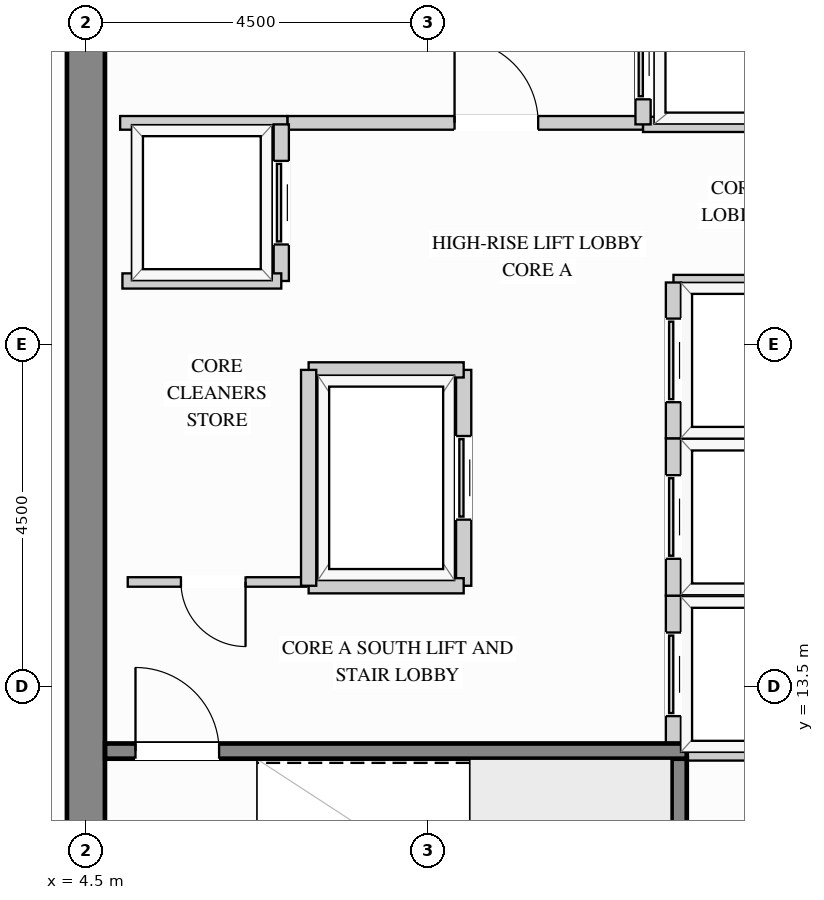
"""IFC4 building model, lengths in metres.
Left out: names, types, materials, properties, quantities, classifications, styles, units other than length and angle.
Written with IfcOpenShell. Run it as: python <this file> out.ifc"""

import sys

from ifc_helpers import new_model, si_unit, direction, frame, frame_2d, origin, place, context, subcontext, project, spatial, rectangle, extrude, source, transform, mapped, element, fill, save


model = new_model("IFC4")
c1 = context("Model", 3, precision=1e-05, world=origin(), true_north=direction((0.0, 1.0)))
c2 = subcontext(c1, "Body", "Model", "MODEL_VIEW")
j1 = project(units=[si_unit("LENGTHUNIT", "METRE"), si_unit("PLANEANGLEUNIT", "RADIAN")], contexts=[c1])
p1 = place(None, origin())
s1 = spatial("IfcSite", under=j1, at=p1, CompositionType="ELEMENT")
p2 = place(p1, origin())
s2 = spatial("IfcBuilding", under=s1, at=p2, CompositionType="ELEMENT")
p3 = place(p2, frame((0.0, 0.0, 266.4)))
s3 = spatial("IfcBuildingStorey", under=s2, at=p3, CompositionType="ELEMENT", Elevation=266.4)
m1 = source(origin(), c2, "Body", "SweptSolid", [
    extrude(rectangle(XDim=20.5, YDim=0.5, at=frame_2d((10.25, 0.0))), origin(), (0.0, 0.0, 1.0), 3.4),
])
p4 = place(p3, frame((4.5, 8.75, 0.0), z_axis=(0.0, 0.0, 1.0), x_axis=(0.0, 1.0, 0.0)))
e1 = element("IfcWall", 1, at=p4, inside=s3, PredefinedType="SHEAR", context=c2, shape_type="MappedRepresentation", body=[
    mapped(m1, transform((0.0, 0.0, 0.0), x_axis=(1.0, 0.0, 0.0), y_axis=(0.0, 1.0, 0.0), z_axis=(0.0, 0.0, 1.0))),
])
p5 = place(p3, frame((7.15, 20.92, 0.0), z_axis=(0.0, 0.0, 1.0), x_axis=(1.0, 0.0, 0.0)))
e2 = element("IfcWall", 2, at=p5, inside=s3, PredefinedType="PARTITIONING", context=c2, shape_type="SweptSolid", body=[
    extrude(rectangle(XDim=4.68, YDim=0.18, at=frame_2d((2.34, 0.0))), origin(), (0.0, 0.0, 1.0), 3.385),
])
p6 = place(p5, frame((2.2, 0.0, 0.0)))
e3 = element("IfcOpeningElement", 3, at=p6, cuts=e2, PredefinedType="OPENING", context=c2, shape_type="SweptSolid", body=[
    extrude(rectangle(XDim=1.1, YDim=2.15, at=frame_2d((0.55, 1.075))), frame((0.0, 0.1, 0.0), z_axis=(0.0, -1.0, 0.0), x_axis=(1.0, 0.0, 0.0)), (0.0, 0.0, 1.0), 0.2),
])
m2 = source(origin(), c2, "Body", "SweptSolid", [
    extrude(rectangle(XDim=2.2, YDim=0.18, at=frame_2d((1.1, 0.0))), origin(), (0.0, 0.0, 1.0), 3.385),
])
p7 = place(p3, frame((4.95, 20.92, 0.0), z_axis=(0.0, 0.0, 1.0), x_axis=(1.0, 0.0, 0.0)))
e4 = element("IfcWall", 4, at=p7, inside=s3, PredefinedType="PARTITIONING", context=c2, shape_type="MappedRepresentation", body=[
    mapped(m2, transform((0.0, 0.0, 0.0), x_axis=(1.0, 0.0, 0.0), y_axis=(0.0, 1.0, 0.0), z_axis=(0.0, 0.0, 1.0))),
])
p8 = place(p3, frame((5.05, 14.88, 0.0), z_axis=(0.0, 0.0, 1.0), x_axis=(1.0, 0.0, 0.0)))
e5 = element("IfcWall", 5, at=p8, inside=s3, PredefinedType="PARTITIONING", context=c2, shape_type="SweptSolid", body=[
    extrude(rectangle(XDim=2.35, YDim=0.125, at=frame_2d((1.175, 0.0))), origin(), (0.0, 0.0, 1.0), 3.385),
])
p9 = place(p8, frame((0.7, 0.0, 0.0)))
e6 = element("IfcOpeningElement", 6, at=p9, cuts=e5, PredefinedType="OPENING", context=c2, shape_type="SweptSolid", body=[
    extrude(rectangle(XDim=0.85, YDim=2.1, at=frame_2d((0.425, 1.05))), frame((0.0, 0.073, 0.0), z_axis=(0.0, -1.0, 0.0), x_axis=(1.0, 0.0, 0.0)), (0.0, 0.0, 1.0), 0.145),
])
m3 = source(origin(), c2, "Body", "SweptSolid", [
    extrude(rectangle(XDim=2.39, YDim=0.2, at=frame_2d((1.195, 0.0))), origin(), (0.0, 0.0, 1.0), 3.385),
])
p10 = place(p3, frame((11.83, 20.9, 0.0), z_axis=(0.0, 0.0, 1.0), x_axis=(1.0, 0.0, 0.0)))
e7 = element("IfcWall", 7, at=p10, inside=s3, PredefinedType="PARTITIONING", context=c2, shape_type="MappedRepresentation", body=[
    mapped(m3, transform((0.0, 0.0, 0.0), x_axis=(1.0, 0.0, 0.0), y_axis=(0.0, 1.0, 0.0), z_axis=(0.0, 0.0, 1.0))),
])
p11 = place(p3, frame((11.83, 20.9, 0.0), z_axis=(0.0, 0.0, 1.0), x_axis=(0.0, 1.0, 0.0)))
e8 = element("IfcWall", 8, at=p11, inside=s3, PredefinedType="PARTITIONING", context=c2, shape_type="SweptSolid", body=[
    extrude(rectangle(XDim=1.76, YDim=0.2, at=frame_2d((0.88, 0.0))), origin(), (0.0, 0.0, 1.0), 3.385),
])
p12 = place(p11, frame((0.33, 0.0, 0.0)))
e9 = element("IfcOpeningElement", 9, at=p12, cuts=e8, PredefinedType="OPENING", context=c2, shape_type="SweptSolid", body=[
    extrude(rectangle(XDim=1.1, YDim=2.2, at=frame_2d((0.55, 1.1))), frame((0.0, 0.11, 0.0), z_axis=(0.0, -1.0, 0.0), x_axis=(1.0, 0.0, 0.0)), (0.0, 0.0, 1.0), 0.22),
])
m4 = source(origin(), c2, "Body", "SweptSolid", [
    extrude(rectangle(XDim=1.99, YDim=0.2, at=frame_2d((0.995, 0.0))), origin(), (0.0, 0.0, 1.0), 3.385),
])
for number, where, z_axis, x_axis in (
    (10, (12.23, 14.7, 0.0), (0.0, 0.0, 1.0), (1.0, 0.0, 0.0)),
    (11, (12.23, 12.63, 0.0), (0.0, 0.0, 1.0), (1.0, 0.0, 0.0)),
):
    element("IfcWall", number, at=place(p3, frame(where, z_axis=z_axis, x_axis=x_axis)), inside=s3, PredefinedType="PARTITIONING", context=c2, shape_type="MappedRepresentation", body=[
        mapped(m4, transform((0.0, 0.0, 0.0), x_axis=(1.0, 0.0, 0.0), y_axis=(0.0, 1.0, 0.0), z_axis=(0.0, 0.0, 1.0))),
    ])
p13 = place(p3, frame((12.23, 12.63, 0.0), z_axis=(0.0, 0.0, 1.0), x_axis=(0.0, 1.0, 0.0)))
e12 = element("IfcWall", 12, at=p13, inside=s3, PredefinedType="PARTITIONING", context=c2, shape_type="SweptSolid", body=[
    extrude(rectangle(XDim=2.07, YDim=0.2, at=frame_2d((1.035, 0.0))), origin(), (0.0, 0.0, 1.0), 3.385),
])
p14 = place(p13, frame((0.485, 0.0, 0.0)))
e13 = element("IfcOpeningElement", 13, at=p14, cuts=e12, PredefinedType="OPENING", context=c2, shape_type="SweptSolid", body=[
    extrude(rectangle(XDim=1.1, YDim=2.2, at=frame_2d((0.55, 1.1))), frame((0.0, 0.11, 0.0), z_axis=(0.0, -1.0, 0.0), x_axis=(1.0, 0.0, 0.0)), (0.0, 0.0, 1.0), 0.22),
])
p15 = place(p3, frame((12.23, 16.77, 0.0), z_axis=(0.0, 0.0, 1.0), x_axis=(1.0, 0.0, 0.0)))
e14 = element("IfcWall", 14, at=p15, inside=s3, PredefinedType="PARTITIONING", context=c2, shape_type="MappedRepresentation", body=[
    mapped(m4, transform((0.0, 0.0, 0.0), x_axis=(1.0, 0.0, 0.0), y_axis=(0.0, 1.0, 0.0), z_axis=(0.0, 0.0, 1.0))),
])
p16 = place(p3, frame((12.23, 14.7, 0.0), z_axis=(0.0, 0.0, 1.0), x_axis=(0.0, 1.0, 0.0)))
e15 = element("IfcWall", 15, at=p16, inside=s3, PredefinedType="PARTITIONING", context=c2, shape_type="SweptSolid", body=[
    extrude(rectangle(XDim=2.07, YDim=0.2, at=frame_2d((1.035, 0.0))), origin(), (0.0, 0.0, 1.0), 3.385),
])
p17 = place(p16, frame((0.485, 0.0, 0.0)))
e16 = element("IfcOpeningElement", 16, at=p17, cuts=e15, PredefinedType="OPENING", context=c2, shape_type="SweptSolid", body=[
    extrude(rectangle(XDim=1.1, YDim=2.2, at=frame_2d((0.55, 1.1))), frame((0.0, 0.11, 0.0), z_axis=(0.0, -1.0, 0.0), x_axis=(1.0, 0.0, 0.0)), (0.0, 0.0, 1.0), 0.22),
])
p18 = place(p3, frame((12.23, 18.82, 0.0), z_axis=(0.0, 0.0, 1.0), x_axis=(1.0, 0.0, 0.0)))
e17 = element("IfcWall", 17, at=p18, inside=s3, PredefinedType="PARTITIONING", context=c2, shape_type="MappedRepresentation", body=[
    mapped(m4, transform((0.0, 0.0, 0.0), x_axis=(1.0, 0.0, 0.0), y_axis=(0.0, 1.0, 0.0), z_axis=(0.0, 0.0, 1.0))),
])
p19 = place(p3, frame((12.23, 16.77, 0.0), z_axis=(0.0, 0.0, 1.0), x_axis=(0.0, 1.0, 0.0)))
e18 = element("IfcWall", 18, at=p19, inside=s3, PredefinedType="PARTITIONING", context=c2, shape_type="SweptSolid", body=[
    extrude(rectangle(XDim=2.05, YDim=0.2, at=frame_2d((1.025, 0.0))), origin(), (0.0, 0.0, 1.0), 3.385),
])
p20 = place(p19, frame((0.475, 0.0, 0.0)))
e19 = element("IfcOpeningElement", 19, at=p20, cuts=e18, PredefinedType="OPENING", context=c2, shape_type="SweptSolid", body=[
    extrude(rectangle(XDim=1.1, YDim=2.2, at=frame_2d((0.55, 1.1))), frame((0.0, 0.11, 0.0), z_axis=(0.0, -1.0, 0.0), x_axis=(1.0, 0.0, 0.0)), (0.0, 0.0, 1.0), 0.22),
])
p21 = place(p3, frame((7.07, 18.84, 0.0), z_axis=(0.0, 0.0, 1.0), x_axis=(0.0, 1.0, 0.0)))
e20 = element("IfcWall", 20, at=p21, inside=s3, PredefinedType="PARTITIONING", context=c2, shape_type="SweptSolid", body=[
    extrude(rectangle(XDim=2.06, YDim=0.2, at=frame_2d((1.03, 0.0))), origin(), (0.0, 0.0, 1.0), 3.385),
])
p22 = place(p21, frame((0.48, 0.0, 0.0)))
e21 = element("IfcOpeningElement", 21, at=p22, cuts=e20, PredefinedType="OPENING", context=c2, shape_type="SweptSolid", body=[
    extrude(rectangle(XDim=1.1, YDim=2.2, at=frame_2d((0.55, 1.1))), frame((0.0, 0.11, 0.0), z_axis=(0.0, -1.0, 0.0), x_axis=(1.0, 0.0, 0.0)), (0.0, 0.0, 1.0), 0.22),
])
m5 = source(origin(), c2, "Body", "SweptSolid", [
    extrude(rectangle(XDim=2.09, YDim=0.2, at=frame_2d((1.045, 0.0))), origin(), (0.0, 0.0, 1.0), 3.385),
])
p23 = place(p3, frame((4.98, 18.84, 0.0), z_axis=(0.0, 0.0, 1.0), x_axis=(1.0, 0.0, 0.0)))
e22 = element("IfcWall", 22, at=p23, inside=s3, PredefinedType="PARTITIONING", context=c2, shape_type="MappedRepresentation", body=[
    mapped(m5, transform((0.0, 0.0, 0.0), x_axis=(1.0, 0.0, 0.0), y_axis=(0.0, 1.0, 0.0), z_axis=(0.0, 0.0, 1.0))),
])
p24 = place(p3, frame((9.47, 14.83, 0.0), z_axis=(0.0, 0.0, 1.0), x_axis=(0.0, 1.0, 0.0)))
e23 = element("IfcWall", 23, at=p24, inside=s3, PredefinedType="PARTITIONING", context=c2, shape_type="SweptSolid", body=[
    extrude(rectangle(XDim=2.84, YDim=0.2, at=frame_2d((1.42, 0.0))), origin(), (0.0, 0.0, 1.0), 3.385),
])
p25 = place(p24, frame((0.87, 0.0, 0.0)))
e24 = element("IfcOpeningElement", 24, at=p25, cuts=e23, PredefinedType="OPENING", context=c2, shape_type="SweptSolid", body=[
    extrude(rectangle(XDim=1.1, YDim=2.2, at=frame_2d((0.55, 1.1))), frame((0.0, 0.11, 0.0), z_axis=(0.0, -1.0, 0.0), x_axis=(1.0, 0.0, 0.0)), (0.0, 0.0, 1.0), 0.22),
])
m6 = source(origin(), c2, "Body", "SweptSolid", [
    extrude(rectangle(XDim=2.04, YDim=0.2, at=frame_2d((1.02, 0.0))), origin(), (0.0, 0.0, 1.0), 3.385),
])
for number, where, z_axis, x_axis in (
    (25, (7.43, 17.67, 0.0), (0.0, 0.0, 1.0), (1.0, 0.0, 0.0)),
    (26, (7.43, 14.83, 0.0), (0.0, 0.0, 1.0), (1.0, 0.0, 0.0)),
):
    element("IfcWall", number, at=place(p3, frame(where, z_axis=z_axis, x_axis=x_axis)), inside=s3, PredefinedType="PARTITIONING", context=c2, shape_type="MappedRepresentation", body=[
        mapped(m6, transform((0.0, 0.0, 0.0), x_axis=(1.0, 0.0, 0.0), y_axis=(0.0, 1.0, 0.0), z_axis=(0.0, 0.0, 1.0))),
    ])
m7 = source(origin(), c2, "Body", "SweptSolid", [
    extrude(rectangle(XDim=2.84, YDim=0.2, at=frame_2d((1.42, 0.0))), origin(), (0.0, 0.0, 1.0), 3.385),
])
p26 = place(p3, frame((7.43, 14.83, 0.0), z_axis=(0.0, 0.0, 1.0), x_axis=(0.0, 1.0, 0.0)))
e27 = element("IfcWall", 27, at=p26, inside=s3, PredefinedType="PARTITIONING", context=c2, shape_type="MappedRepresentation", body=[
    mapped(m7, transform((0.0, 0.0, 0.0), x_axis=(1.0, 0.0, 0.0), y_axis=(0.0, 1.0, 0.0), z_axis=(0.0, 0.0, 1.0))),
])
m8 = source(origin(), c2, "Body", "SweptSolid", [
    extrude(rectangle(XDim=3.803, YDim=0.2, at=frame_2d((1.901, 0.0))), origin(), (0.0, 0.0, 1.0), 3.4),
])
p27 = place(p3, frame((12.305, 8.752, 0.0), z_axis=(0.0, 0.0, 1.0), x_axis=(0.0, 1.0, 0.0)))
e28 = element("IfcWall", 28, at=p27, inside=s3, PredefinedType="SHEAR", context=c2, shape_type="MappedRepresentation", body=[
    mapped(m8, transform((0.0, 0.0, 0.0), x_axis=(1.0, 0.0, 0.0), y_axis=(0.0, 1.0, 0.0), z_axis=(0.0, 0.0, 1.0))),
])
p28 = place(p3, frame((4.752, 12.655, 0.0), z_axis=(0.0, 0.0, 1.0), x_axis=(1.0, 0.0, 0.0)))
e29 = element("IfcWall", 29, at=p28, inside=s3, PredefinedType="SHEAR", context=c2, shape_type="SweptSolid", body=[
    extrude(rectangle(XDim=7.653, YDim=0.2, at=frame_2d((3.827, 0.0))), origin(), (0.0, 0.0, 1.0), 3.4),
])
p29 = place(p28, frame((0.4, 0.0, 0.0)))
e30 = element("IfcOpeningElement", 30, at=p29, cuts=e29, PredefinedType="OPENING", context=c2, shape_type="SweptSolid", body=[
    extrude(rectangle(XDim=1.1, YDim=2.15, at=frame_2d((0.55, 1.075))), frame((0.0, 0.11, 0.0), z_axis=(0.0, -1.0, 0.0), x_axis=(1.0, 0.0, 0.0)), (0.0, 0.0, 1.0), 0.22),
])
m9 = source(origin(), c2, "Body", "SweptSolid", [
    extrude(rectangle(XDim=1.1, YDim=2.15, at=frame_2d((0.55, 1.075))), frame((0.0, 0.025, 0.0), z_axis=(0.0, -1.0, 0.0), x_axis=(1.0, 0.0, 0.0)), (0.0, 0.0, 1.0), 0.05),
])
p30 = place(p6, origin())
e31 = element("IfcDoor", 31, at=p30, inside=s3, OperationType="SINGLE_SWING_LEFT", PredefinedType="DOOR", context=c2, shape_type="MappedRepresentation", body=[
    mapped(m9, transform((0.0, 0.0, 0.0), x_axis=(1.0, 0.0, 0.0), y_axis=(0.0, 1.0, 0.0), z_axis=(0.0, 0.0, 1.0))),
])
fill(e3, e31)
m10 = source(origin(), c2, "Body", "SweptSolid", [
    extrude(rectangle(XDim=1.1, YDim=2.2, at=frame_2d((0.55, 1.1))), frame((0.0, 0.025, 0.0), z_axis=(0.0, -1.0, 0.0), x_axis=(1.0, 0.0, 0.0)), (0.0, 0.0, 1.0), 0.05),
])
p31 = place(p12, origin())
e32 = element("IfcDoor", 32, at=p31, inside=s3, OperationType="SLIDING_TO_LEFT", PredefinedType="DOOR", context=c2, shape_type="MappedRepresentation", body=[
    mapped(m10, transform((0.0, 0.0, 0.0), x_axis=(1.0, 0.0, 0.0), y_axis=(0.0, 1.0, 0.0), z_axis=(0.0, 0.0, 1.0))),
])
fill(e9, e32)
p32 = place(p14, origin())
e33 = element("IfcDoor", 33, at=p32, inside=s3, OperationType="SLIDING_TO_LEFT", PredefinedType="DOOR", context=c2, shape_type="MappedRepresentation", body=[
    mapped(m10, transform((0.0, 0.0, 0.0), x_axis=(1.0, 0.0, 0.0), y_axis=(0.0, 1.0, 0.0), z_axis=(0.0, 0.0, 1.0))),
])
fill(e13, e33)
p33 = place(p17, origin())
e34 = element("IfcDoor", 34, at=p33, inside=s3, OperationType="SLIDING_TO_LEFT", PredefinedType="DOOR", context=c2, shape_type="MappedRepresentation", body=[
    mapped(m10, transform((0.0, 0.0, 0.0), x_axis=(1.0, 0.0, 0.0), y_axis=(0.0, 1.0, 0.0), z_axis=(0.0, 0.0, 1.0))),
])
fill(e16, e34)
p34 = place(p20, origin())
e35 = element("IfcDoor", 35, at=p34, inside=s3, OperationType="SLIDING_TO_LEFT", PredefinedType="DOOR", context=c2, shape_type="MappedRepresentation", body=[
    mapped(m10, transform((0.0, 0.0, 0.0), x_axis=(1.0, 0.0, 0.0), y_axis=(0.0, 1.0, 0.0), z_axis=(0.0, 0.0, 1.0))),
])
fill(e19, e35)
p35 = place(p22, origin())
e36 = element("IfcDoor", 36, at=p35, inside=s3, OperationType="SLIDING_TO_LEFT", PredefinedType="DOOR", context=c2, shape_type="MappedRepresentation", body=[
    mapped(m10, transform((0.0, 0.0, 0.0), x_axis=(1.0, 0.0, 0.0), y_axis=(0.0, 1.0, 0.0), z_axis=(0.0, 0.0, 1.0))),
])
fill(e21, e36)
p36 = place(p25, origin())
e37 = element("IfcDoor", 37, at=p36, inside=s3, OperationType="SLIDING_TO_LEFT", PredefinedType="DOOR", context=c2, shape_type="MappedRepresentation", body=[
    mapped(m10, transform((0.0, 0.0, 0.0), x_axis=(1.0, 0.0, 0.0), y_axis=(0.0, 1.0, 0.0), z_axis=(0.0, 0.0, 1.0))),
])
fill(e24, e37)
m11 = source(origin(), c2, "Body", "SweptSolid", [
    extrude(rectangle(XDim=0.85, YDim=2.1, at=frame_2d((0.425, 1.05))), frame((0.0, 0.025, 0.0), z_axis=(0.0, -1.0, 0.0), x_axis=(1.0, 0.0, 0.0)), (0.0, 0.0, 1.0), 0.05),
])
p37 = place(p9, origin())
e38 = element("IfcDoor", 38, at=p37, inside=s3, OperationType="SINGLE_SWING_RIGHT", PredefinedType="DOOR", context=c2, shape_type="MappedRepresentation", body=[
    mapped(m11, transform((0.0, 0.0, 0.0), x_axis=(1.0, 0.0, 0.0), y_axis=(0.0, 1.0, 0.0), z_axis=(0.0, 0.0, 1.0))),
])
fill(e6, e38)
m12 = source(origin(), c2, "Body", "SweptSolid", [
    extrude(rectangle(XDim=1.1, YDim=2.15, at=frame_2d((0.55, 1.075))), frame((0.0, 0.025, 0.0), z_axis=(0.0, -1.0, 0.0), x_axis=(1.0, 0.0, 0.0)), (0.0, 0.0, 1.0), 0.05),
])
p38 = place(p29, origin())
e39 = element("IfcDoor", 39, at=p38, inside=s3, OperationType="SINGLE_SWING_LEFT", PredefinedType="DOOR", context=c2, shape_type="MappedRepresentation", body=[
    mapped(m12, transform((0.0, 0.0, 0.0), x_axis=(1.0, 0.0, 0.0), y_axis=(0.0, 1.0, 0.0), z_axis=(0.0, 0.0, 1.0))),
])
fill(e30, e39)
save(model, sys.argv[1])
